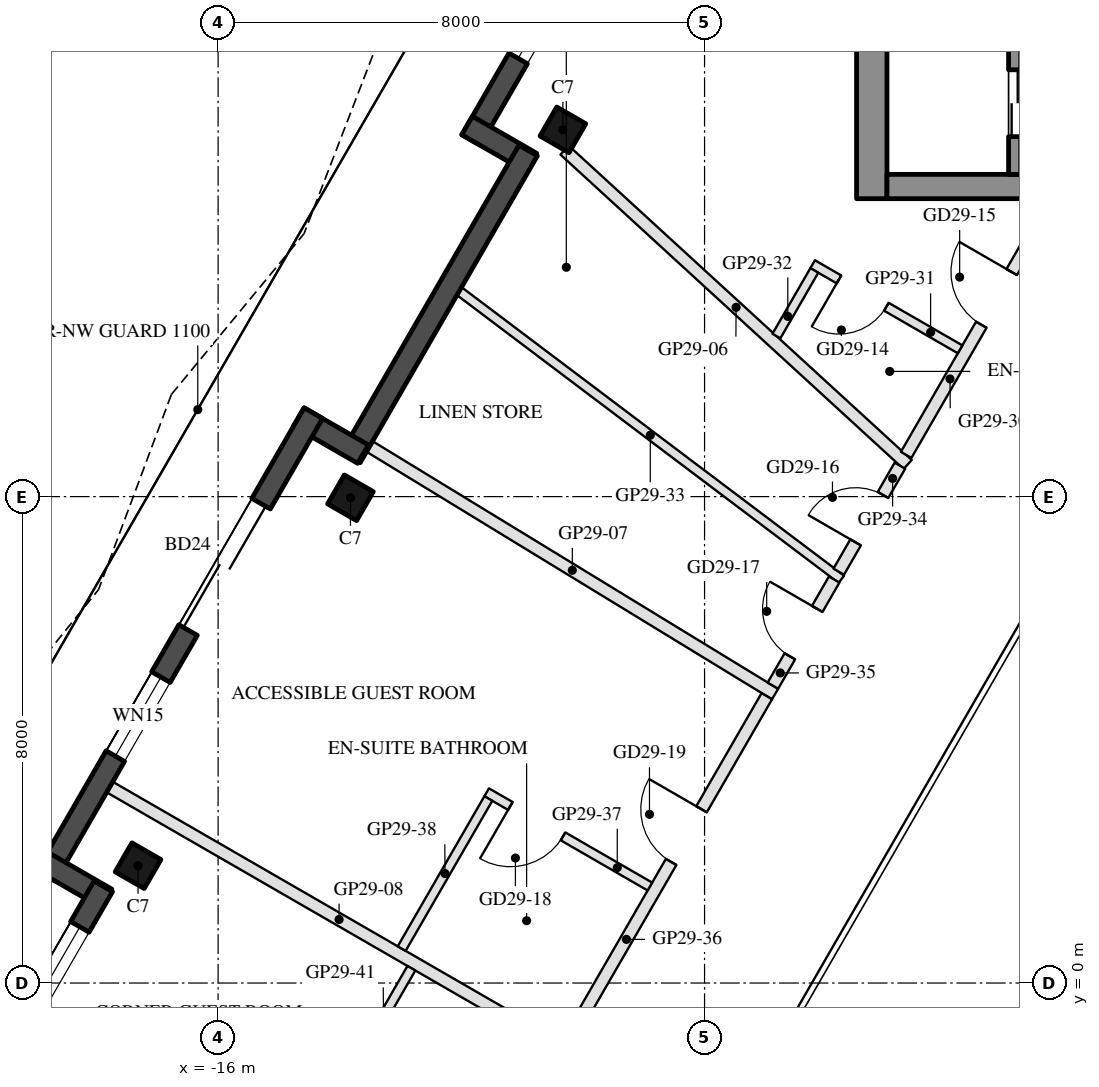
"""IFC4 building model, lengths in metres.
Left out: names, types, materials, properties, quantities, classifications, styles, units other than length and angle.
Written with IfcOpenShell. Run it as: python <this file> out.ifc"""

import sys

from ifc_helpers import new_model, si_unit, direction, frame, frame_2d, origin, origin_2d, place, context, subcontext, project, spatial, rectangle, hollow_rectangle, extrude, boolean, halfspace, element, fill, save


model = new_model("IFC4")
c1 = context("Model", 3, precision=1e-05, world=origin(), true_north=direction((0.0, 1.0)))
c2 = subcontext(c1, "Body", "Model", "MODEL_VIEW")
j1 = project(units=[si_unit("LENGTHUNIT", "METRE"), si_unit("PLANEANGLEUNIT", "RADIAN")], contexts=[c1])
p1 = place(None, origin())
s1 = spatial("IfcSite", under=j1, at=p1, CompositionType="ELEMENT")
p2 = place(p1, origin())
s2 = spatial("IfcBuilding", under=s1, at=p2, CompositionType="ELEMENT")
p3 = place(p2, frame((0.0, 0.0, 291.1)))
s3 = spatial("IfcBuildingStorey", under=s2, at=p3, CompositionType="ELEMENT", Elevation=291.1)
p4 = place(p3, frame((-10.33, 14.032, 0.0), z_axis=(0.0, 0.0, 1.0), x_axis=(0.5, 0.866025403784, 0.0)))
e1 = element("IfcColumn", 1, at=p4, inside=s3, PredefinedType="COLUMN", context=c2, shape_type="SweptSolid", body=[
    boolean("DIFFERENCE", extrude(hollow_rectangle(XDim=0.55, YDim=0.55, WallThickness=0.025, at=origin_2d()), origin(), (0.0, 0.0, 1.0), 3.7), halfspace(frame((0.0, 0.0, 0.034), z_axis=(0.0, 0.0, 1.0), x_axis=(1.0, 0.0, 0.0)), True)),
])
p5 = place(p3, frame((-13.823, 7.981, 0.0), z_axis=(0.0, 0.0, 1.0), x_axis=(0.5, 0.866025403784, 0.0)))
e2 = element("IfcColumn", 2, at=p5, inside=s3, PredefinedType="COLUMN", context=c2, shape_type="SweptSolid", body=[
    boolean("DIFFERENCE", extrude(hollow_rectangle(XDim=0.55, YDim=0.55, WallThickness=0.025, at=origin_2d()), origin(), (0.0, 0.0, 1.0), 3.7), halfspace(frame((0.0, 0.0, 0.031), z_axis=(0.0, 0.0, 1.0), x_axis=(1.0, 0.0, 0.0)), True)),
])
p6 = place(p3, frame((-17.317, 1.93, 0.0), z_axis=(0.0, 0.0, 1.0), x_axis=(0.5, 0.866025403784, 0.0)))
e3 = element("IfcColumn", 3, at=p6, inside=s3, PredefinedType="COLUMN", context=c2, shape_type="SweptSolid", body=[
    boolean("DIFFERENCE", extrude(hollow_rectangle(XDim=0.55, YDim=0.55, WallThickness=0.025, at=origin_2d()), origin(), (0.0, 0.0, 1.0), 3.7), halfspace(frame((0.0, 0.0, 0.034), z_axis=(0.0, 0.0, 1.0), x_axis=(1.0, 0.0, 0.0)), True)),
])
p7 = place(p3, frame((-6.563, 23.005, 0.0), z_axis=(0.0, 0.0, 1.0), x_axis=(-0.500010118922, -0.866019561543, 0.0)))
e4 = element("IfcWall", 4, at=p7, inside=s3, PredefinedType="SOLIDWALL", context=c2, shape_type="SweptSolid", body=[
    extrude(rectangle(XDim=10.554, YDim=0.35, at=frame_2d((5.277, 0.0))), origin(), (0.0, 0.0, 1.0), 3.55),
])
p8 = place(p7, frame((0.38, 0.0, 0.3)))
e5 = element("IfcOpeningElement", 5, at=p8, cuts=e4, PredefinedType="OPENING", context=c2, shape_type="SweptSolid", body=[
    extrude(rectangle(XDim=1.6, YDim=2.65, at=frame_2d((0.8, 1.325))), frame((0.0, 0.185, 0.0), z_axis=(0.0, -1.0, 0.0), x_axis=(1.0, 0.0, 0.0)), (0.0, 0.0, 1.0), 0.37),
])
p9 = place(p7, frame((3.798, 0.0, 0.0)))
e6 = element("IfcOpeningElement", 6, at=p9, cuts=e4, PredefinedType="OPENING", context=c2, shape_type="SweptSolid", body=[
    extrude(rectangle(XDim=2.4, YDim=2.4, at=frame_2d((1.2, 1.2))), frame((0.0, 0.185, 0.0), z_axis=(0.0, -1.0, 0.0), x_axis=(1.0, 0.0, 0.0)), (0.0, 0.0, 1.0), 0.37),
])
p10 = place(p7, frame((7.404, 0.0, 0.3)))
e7 = element("IfcOpeningElement", 7, at=p10, cuts=e4, PredefinedType="OPENING", context=c2, shape_type="SweptSolid", body=[
    extrude(rectangle(XDim=1.6, YDim=2.65, at=frame_2d((0.8, 1.325))), frame((0.0, 0.185, 0.0), z_axis=(0.0, -1.0, 0.0), x_axis=(1.0, 0.0, 0.0)), (0.0, 0.0, 1.0), 0.37),
])
p11 = place(p3, frame((-11.905, 14.104, 0.0), z_axis=(0.0, 0.0, 1.0), x_axis=(0.866005645448, -0.500034220881, 0.0)))
e8 = element("IfcWall", 8, at=p11, inside=s3, PredefinedType="SOLIDWALL", context=c2, shape_type="SweptSolid", body=[
    extrude(rectangle(XDim=1.22, YDim=0.35, at=frame_2d((0.61, 0.0))), origin(), (0.0, 0.0, 1.0), 3.55),
])
p12 = place(p3, frame((-10.901, 13.692, 0.0), z_axis=(0.0, 0.0, 1.0), x_axis=(-0.499987198161, -0.866032794804, 0.0)))
e9 = element("IfcWall", 9, at=p12, inside=s3, PredefinedType="SOLIDWALL", context=c2, shape_type="SweptSolid", body=[
    extrude(rectangle(XDim=5.827, YDim=0.35, at=frame_2d((2.914, 0.0))), origin(), (0.0, 0.0, 1.0), 3.55),
])
p13 = place(p3, frame((-13.616, 8.698, 0.0), z_axis=(0.0, 0.0, 1.0), x_axis=(-0.866005645448, 0.500034220881, 0.0)))
e10 = element("IfcWall", 10, at=p13, inside=s3, PredefinedType="SOLIDWALL", context=c2, shape_type="SweptSolid", body=[
    extrude(rectangle(XDim=1.22, YDim=0.35, at=frame_2d((0.61, 0.0))), origin(), (0.0, 0.0, 1.0), 3.55),
])
p14 = place(p3, frame((-14.434, 9.373, 0.0), z_axis=(0.0, 0.0, 1.0), x_axis=(-0.499999835575, -0.866025498715, 0.0)))
e11 = element("IfcWall", 11, at=p14, inside=s3, PredefinedType="SOLIDWALL", context=c2, shape_type="SweptSolid", body=[
    extrude(rectangle(XDim=8.787, YDim=0.35, at=frame_2d((4.394, 0.0))), origin(), (0.0, 0.0, 1.0), 3.55),
])
p15 = place(p14, frame((1.719, 0.0, 0.0)))
e12 = element("IfcOpeningElement", 12, at=p15, cuts=e11, PredefinedType="OPENING", context=c2, shape_type="SweptSolid", body=[
    extrude(rectangle(XDim=2.4, YDim=2.4, at=frame_2d((1.2, 1.2))), frame((0.0, 0.185, 0.0), z_axis=(0.0, -1.0, 0.0), x_axis=(1.0, 0.0, 0.0)), (0.0, 0.0, 1.0), 0.37),
])
p16 = place(p14, frame((5.013, 0.0, 0.3)))
e13 = element("IfcOpeningElement", 13, at=p16, cuts=e11, PredefinedType="OPENING", context=c2, shape_type="SweptSolid", body=[
    extrude(rectangle(XDim=1.5, YDim=2.65, at=frame_2d((0.75, 1.325))), frame((0.0, 0.185, 0.0), z_axis=(0.0, -1.0, 0.0), x_axis=(1.0, 0.0, 0.0)), (0.0, 0.0, 1.0), 0.37),
])
p17 = place(p3, frame((-18.892, 2.002, 0.0), z_axis=(0.0, 0.0, 1.0), x_axis=(0.866042269935, -0.499970785833, 0.0)))
e14 = element("IfcWall", 14, at=p17, inside=s3, PredefinedType="SOLIDWALL", context=c2, shape_type="SweptSolid", body=[
    extrude(rectangle(XDim=1.22, YDim=0.35, at=frame_2d((0.61, 0.0))), origin(), (0.0, 0.0, 1.0), 3.55),
])
p18 = place(p3, frame((-17.888, 1.59, 0.0), z_axis=(0.0, 0.0, 1.0), x_axis=(-0.499987198161, -0.866032794804, 0.0)))
e15 = element("IfcWall", 15, at=p18, inside=s3, PredefinedType="SOLIDWALL", context=c2, shape_type="SweptSolid", body=[
    extrude(rectangle(XDim=5.827, YDim=0.35, at=frame_2d((2.914, 0.0))), origin(), (0.0, 0.0, 1.0), 3.55),
])
p19 = place(p18, frame((2.657, 0.0, 0.0)))
e16 = element("IfcOpeningElement", 16, at=p19, cuts=e15, PredefinedType="OPENING", context=c2, shape_type="SweptSolid", body=[
    extrude(rectangle(XDim=2.4, YDim=2.4, at=frame_2d((1.2, 1.2))), frame((0.0, 0.185, 0.0), z_axis=(0.0, -1.0, 0.0), x_axis=(1.0, 0.0, 0.0)), (0.0, 0.0, 1.0), 0.37),
])
p20 = place(p18, frame((0.77, 0.0, 0.3)))
e17 = element("IfcOpeningElement", 17, at=p20, cuts=e15, PredefinedType="OPENING", context=c2, shape_type="SweptSolid", body=[
    extrude(rectangle(XDim=1.5, YDim=2.65, at=frame_2d((0.75, 1.325))), frame((0.0, 0.185, 0.0), z_axis=(0.0, -1.0, 0.0), x_axis=(1.0, 0.0, 0.0)), (0.0, 0.0, 1.0), 0.37),
])
p21 = place(p3, frame((-5.25, 12.9, 0.0), z_axis=(0.0, 0.0, 1.0), x_axis=(0.0, 1.0, 0.0)))
e18 = element("IfcWall", 18, at=p21, inside=s3, PredefinedType="SHEAR", context=c2, shape_type="SweptSolid", body=[
    extrude(rectangle(XDim=11.222, YDim=0.5, at=frame_2d((5.611, 0.0))), origin(), (0.0, 0.0, 1.0), 3.5),
])
p22 = place(p3, frame((5.0, 13.1, 0.0), z_axis=(0.0, 0.0, 1.0), x_axis=(-1.0, 0.0, 0.0)))
e19 = element("IfcWall", 19, at=p22, inside=s3, PredefinedType="SHEAR", context=c2, shape_type="SweptSolid", body=[
    extrude(rectangle(XDim=10.0, YDim=0.4, at=frame_2d((5.0, 0.0))), origin(), (0.0, 0.0, 1.0), 3.5),
])
p23 = place(p22, frame((3.55, 0.0, 0.0)))
e20 = element("IfcOpeningElement", 20, at=p23, cuts=e19, PredefinedType="OPENING", context=c2, shape_type="SweptSolid", body=[
    extrude(rectangle(XDim=1.1, YDim=2.1, at=frame_2d((0.55, 1.05))), frame((0.0, 0.21, 0.0), z_axis=(0.0, -1.0, 0.0), x_axis=(1.0, 0.0, 0.0)), (0.0, 0.0, 1.0), 0.42),
])
p24 = place(p22, frame((5.85, 0.0, 0.0)))
e21 = element("IfcOpeningElement", 21, at=p24, cuts=e19, PredefinedType="OPENING", context=c2, shape_type="SweptSolid", body=[
    extrude(rectangle(XDim=1.4, YDim=2.1, at=frame_2d((0.7, 1.05))), frame((0.0, 0.21, 0.0), z_axis=(0.0, -1.0, 0.0), x_axis=(1.0, 0.0, 0.0)), (0.0, 0.0, 1.0), 0.42),
])
p25 = place(p3, frame((-2.9, 13.3, 0.0), z_axis=(0.0, 0.0, 1.0), x_axis=(0.0, 1.0, 0.0)))
e22 = element("IfcWall", 22, at=p25, inside=s3, PredefinedType="SHEAR", context=c2, shape_type="SweptSolid", body=[
    extrude(rectangle(XDim=10.16, YDim=0.2, at=frame_2d((5.08, 0.0))), origin(), (0.0, 0.0, 1.0), 3.5),
])
p26 = place(p25, frame((0.62, 0.0, 0.0)))
e23 = element("IfcOpeningElement", 23, at=p26, cuts=e22, PredefinedType="OPENING", context=c2, shape_type="SweptSolid", body=[
    extrude(rectangle(XDim=1.1, YDim=2.1, at=frame_2d((0.55, 1.05))), frame((0.0, 0.11, 0.0), z_axis=(0.0, -1.0, 0.0), x_axis=(1.0, 0.0, 0.0)), (0.0, 0.0, 1.0), 0.22),
])
p27 = place(p25, frame((3.16, 0.0, 0.0)))
e24 = element("IfcOpeningElement", 24, at=p27, cuts=e22, PredefinedType="OPENING", context=c2, shape_type="SweptSolid", body=[
    extrude(rectangle(XDim=1.1, YDim=2.1, at=frame_2d((0.55, 1.05))), frame((0.0, 0.11, 0.0), z_axis=(0.0, -1.0, 0.0), x_axis=(1.0, 0.0, 0.0)), (0.0, 0.0, 1.0), 0.22),
])
p28 = place(p25, frame((5.7, 0.0, 0.0)))
e25 = element("IfcOpeningElement", 25, at=p28, cuts=e22, PredefinedType="OPENING", context=c2, shape_type="SweptSolid", body=[
    extrude(rectangle(XDim=1.1, YDim=2.1, at=frame_2d((0.55, 1.05))), frame((0.0, 0.11, 0.0), z_axis=(0.0, -1.0, 0.0), x_axis=(1.0, 0.0, 0.0)), (0.0, 0.0, 1.0), 0.22),
])
p29 = place(p25, frame((8.34, 0.0, 0.0)))
e26 = element("IfcOpeningElement", 26, at=p29, cuts=e22, PredefinedType="OPENING", context=c2, shape_type="SweptSolid", body=[
    extrude(rectangle(XDim=0.9, YDim=2.1, at=frame_2d((0.45, 1.05))), frame((0.0, 0.11, 0.0), z_axis=(0.0, -1.0, 0.0), x_axis=(1.0, 0.0, 0.0)), (0.0, 0.0, 1.0), 0.22),
])
p30 = place(p3, frame((-10.302, 13.698, 0.0), z_axis=(0.0, 0.0, 1.0), x_axis=(0.737268015828, -0.675600379541, 0.0)))
e27 = element("IfcWall", 27, at=p30, inside=s3, PredefinedType="PARTITIONING", context=c2, shape_type="SweptSolid", body=[
    extrude(rectangle(XDim=7.653, YDim=0.2, at=frame_2d((3.826, 0.0))), origin(), (0.0, 0.0, 1.0), 3.55),
])
p31 = place(p3, frame((-13.509, 8.825, 0.0), z_axis=(0.0, 0.0, 1.0), x_axis=(0.853427769022, -0.521211130984, 0.0)))
e28 = element("IfcWall", 28, at=p31, inside=s3, PredefinedType="PARTITIONING", context=c2, shape_type="SweptSolid", body=[
    extrude(rectangle(XDim=7.814, YDim=0.2, at=frame_2d((3.907, 0.0))), origin(), (0.0, 0.0, 1.0), 3.16),
])
p32 = place(p3, frame((-17.782, 3.223, 0.0), z_axis=(0.0, 0.0, 1.0), x_axis=(0.866016642396, -0.500015174863, 0.0)))
e29 = element("IfcWall", 29, at=p32, inside=s3, PredefinedType="PARTITIONING", context=c2, shape_type="SweptSolid", body=[
    extrude(rectangle(XDim=8.712, YDim=0.2, at=frame_2d((4.356, 0.0))), origin(), (0.0, 0.0, 1.0), 3.16),
])
p33 = place(p3, frame((-4.685, 8.686, 0.0), z_axis=(0.0, 0.0, 1.0), x_axis=(0.500011088314, 0.866019001848, 0.0)))
e30 = element("IfcWall", 30, at=p33, inside=s3, PredefinedType="PARTITIONING", context=c2, shape_type="SweptSolid", body=[
    extrude(rectangle(XDim=4.808, YDim=0.2, at=frame_2d((2.404, 0.0))), origin(), (0.0, 0.0, 1.0), 3.05),
])
p34 = place(p33, frame((2.472, 0.0, 0.0)))
e31 = element("IfcOpeningElement", 31, at=p34, cuts=e30, PredefinedType="OPENING", context=c2, shape_type="SweptSolid", body=[
    extrude(rectangle(XDim=1.0, YDim=2.1, at=frame_2d((0.5, 1.05))), frame((0.0, 0.11, 0.0), z_axis=(0.0, -1.0, 0.0), x_axis=(1.0, 0.0, 0.0)), (0.0, 0.0, 1.0), 0.22),
])
p35 = place(p3, frame((-3.798, 10.423, 0.0), z_axis=(0.0, 0.0, 1.0), x_axis=(-0.866034573852, 0.49998411664, 0.0)))
e32 = element("IfcWall", 32, at=p35, inside=s3, PredefinedType="PARTITIONING", context=c2, shape_type="SweptSolid", body=[
    extrude(rectangle(XDim=2.8, YDim=0.15, at=frame_2d((1.4, 0.0))), origin(), (0.0, 0.0, 1.0), 3.05),
])
p36 = place(p35, frame((1.4, 0.0, 0.0)))
e33 = element("IfcOpeningElement", 33, at=p36, cuts=e32, PredefinedType="OPENING", context=c2, shape_type="SweptSolid", body=[
    extrude(rectangle(XDim=0.9, YDim=2.1, at=frame_2d((0.45, 1.05))), frame((0.0, 0.085, 0.0), z_axis=(0.0, -1.0, 0.0), x_axis=(1.0, 0.0, 0.0)), (0.0, 0.0, 1.0), 0.17),
])
p37 = place(p3, frame((-6.195, 11.72, 0.0), z_axis=(0.0, 0.0, 1.0), x_axis=(-0.500016430238, -0.866015917575, 0.0)))
e34 = element("IfcWall", 34, at=p37, inside=s3, PredefinedType="PARTITIONING", context=c2, shape_type="SweptSolid", body=[
    extrude(rectangle(XDim=1.246, YDim=0.15, at=frame_2d((0.623, 0.0))), origin(), (0.0, 0.0, 1.0), 3.05),
])
p38 = place(p3, frame((-12.034, 11.379, 0.0), z_axis=(0.0, 0.0, 1.0), x_axis=(0.798392848023, -0.602136911528, 0.0)))
e35 = element("IfcWall", 35, at=p38, inside=s3, PredefinedType="PARTITIONING", context=c2, shape_type="SweptSolid", body=[
    extrude(rectangle(XDim=7.871, YDim=0.15, at=frame_2d((3.936, 0.0))), origin(), (0.0, 0.0, 1.0), 3.05),
])
p39 = place(p3, frame((-5.793, 6.766, 0.0), z_axis=(0.0, 0.0, 1.0), x_axis=(0.500026968848, 0.866009832753, 0.0)))
e36 = element("IfcWall", 36, at=p39, inside=s3, PredefinedType="PARTITIONING", context=c2, shape_type="SweptSolid", body=[
    extrude(rectangle(XDim=2.013, YDim=0.2, at=frame_2d((1.006, 0.0))), origin(), (0.0, 0.0, 1.0), 3.05),
])
p40 = place(p39, frame((0.556, 0.0, 0.0)))
e37 = element("IfcOpeningElement", 37, at=p40, cuts=e36, PredefinedType="OPENING", context=c2, shape_type="SweptSolid", body=[
    extrude(rectangle(XDim=0.9, YDim=2.1, at=frame_2d((0.45, 1.05))), frame((0.0, 0.11, 0.0), z_axis=(0.0, -1.0, 0.0), x_axis=(1.0, 0.0, 0.0)), (0.0, 0.0, 1.0), 0.22),
])
p41 = place(p3, frame((-6.876, 4.891, 0.0), z_axis=(0.0, 0.0, 1.0), x_axis=(0.499865783083, 0.866102880092, 0.0)))
e38 = element("IfcWall", 38, at=p41, inside=s3, PredefinedType="PARTITIONING", context=c2, shape_type="SweptSolid", body=[
    extrude(rectangle(XDim=2.015, YDim=0.2, at=frame_2d((1.008, 0.0))), origin(), (0.0, 0.0, 1.0), 3.55),
])
p42 = place(p41, frame((0.558, 0.0, 0.0)))
e39 = element("IfcOpeningElement", 39, at=p42, cuts=e38, PredefinedType="OPENING", context=c2, shape_type="SweptSolid", body=[
    extrude(rectangle(XDim=0.9, YDim=2.1, at=frame_2d((0.45, 1.05))), frame((0.0, 0.11, 0.0), z_axis=(0.0, -1.0, 0.0), x_axis=(1.0, 0.0, 0.0)), (0.0, 0.0, 1.0), 0.22),
])
p43 = place(p3, frame((-10.275, -0.996, 0.0), z_axis=(0.0, 0.0, 1.0), x_axis=(0.500007539231, 0.866021050964, 0.0)))
e40 = element("IfcWall", 40, at=p43, inside=s3, PredefinedType="PARTITIONING", context=c2, shape_type="SweptSolid", body=[
    extrude(rectangle(XDim=6.598, YDim=0.2, at=frame_2d((3.299, 0.0))), origin(), (0.0, 0.0, 1.0), 3.05),
])
p44 = place(p43, frame((3.45, 0.0, 0.0)))
e41 = element("IfcOpeningElement", 41, at=p44, cuts=e40, PredefinedType="OPENING", context=c2, shape_type="SweptSolid", body=[
    extrude(rectangle(XDim=1.0, YDim=2.1, at=frame_2d((0.5, 1.05))), frame((0.0, 0.11, 0.0), z_axis=(0.0, -1.0, 0.0), x_axis=(1.0, 0.0, 0.0)), (0.0, 0.0, 1.0), 0.22),
])
p45 = place(p3, frame((-8.899, 1.587, 0.0), z_axis=(0.0, 0.0, 1.0), x_axis=(-0.86602952684, 0.49999285859, 0.0)))
e42 = element("IfcWall", 42, at=p45, inside=s3, PredefinedType="PARTITIONING", context=c2, shape_type="SweptSolid", body=[
    extrude(rectangle(XDim=3.1, YDim=0.15, at=frame_2d((1.55, 0.0))), origin(), (0.0, 0.0, 1.0), 3.55),
])
p46 = place(p45, frame((1.65, 0.0, 0.0)))
e43 = element("IfcOpeningElement", 43, at=p46, cuts=e42, PredefinedType="OPENING", context=c2, shape_type="SweptSolid", body=[
    extrude(rectangle(XDim=1.0, YDim=2.1, at=frame_2d((0.5, 1.05))), frame((0.0, 0.085, 0.0), z_axis=(0.0, -1.0, 0.0), x_axis=(1.0, 0.0, 0.0)), (0.0, 0.0, 1.0), 0.17),
])
p47 = place(p3, frame((-11.556, 3.034, 0.0), z_axis=(0.0, 0.0, 1.0), x_axis=(-0.500036373335, -0.866004402611, 0.0)))
e44 = element("IfcWall", 44, at=p47, inside=s3, PredefinedType="PARTITIONING", context=c2, shape_type="SweptSolid", body=[
    extrude(rectangle(XDim=2.85, YDim=0.15, at=frame_2d((1.425, 0.0))), origin(), (0.0, 0.0, 1.0), 3.05),
])
p48 = place(p3, frame((-12.821, 0.243, 0.0), z_axis=(0.0, 0.0, 1.0), x_axis=(-0.500009850223, -0.866019716681, 0.0)))
e45 = element("IfcWall", 45, at=p48, inside=s3, PredefinedType="PARTITIONING", context=c2, shape_type="SweptSolid", body=[
    extrude(rectangle(XDim=1.838, YDim=0.15, at=frame_2d((0.919, 0.0))), origin(), (0.0, 0.0, 1.0), 3.05),
])
p49 = place(p10, origin())
e46 = element("IfcWindow", 46, at=p49, inside=s3, PartitioningType="SINGLE_PANEL", PredefinedType="WINDOW", context=c2, shape_type="SweptSolid", body=[
    extrude(rectangle(XDim=1.6, YDim=2.65, at=frame_2d((0.8, 1.325))), frame((0.0, 0.03, 0.0), z_axis=(0.0, -1.0, 0.0), x_axis=(1.0, 0.0, 0.0)), (0.0, 0.0, 1.0), 0.06),
])
fill(e7, e46)
p50 = place(p15, frame((2.4, 0.0, 0.0), z_axis=(0.0, 0.0, 1.0), x_axis=(-1.0, 0.0, 0.0)))
e47 = element("IfcDoor", 47, at=p50, inside=s3, OperationType="SLIDING_TO_LEFT", PredefinedType="DOOR", context=c2, shape_type="SweptSolid", body=[
    extrude(rectangle(XDim=2.4, YDim=2.4, at=frame_2d((1.2, 1.2))), frame((0.0, 0.025, 0.0), z_axis=(0.0, -1.0, 0.0), x_axis=(1.0, 0.0, 0.0)), (0.0, 0.0, 1.0), 0.05),
])
fill(e12, e47)
p51 = place(p16, origin())
e48 = element("IfcWindow", 48, at=p51, inside=s3, PartitioningType="SINGLE_PANEL", PredefinedType="WINDOW", context=c2, shape_type="SweptSolid", body=[
    extrude(rectangle(XDim=1.5, YDim=2.65, at=frame_2d((0.75, 1.325))), frame((0.0, 0.03, 0.0), z_axis=(0.0, -1.0, 0.0), x_axis=(1.0, 0.0, 0.0)), (0.0, 0.0, 1.0), 0.06),
])
fill(e13, e48)
p52 = place(p20, origin())
e49 = element("IfcWindow", 49, at=p52, inside=s3, PartitioningType="SINGLE_PANEL", PredefinedType="WINDOW", context=c2, shape_type="SweptSolid", body=[
    extrude(rectangle(XDim=1.5, YDim=2.65, at=frame_2d((0.75, 1.325))), frame((0.0, 0.03, 0.0), z_axis=(0.0, -1.0, 0.0), x_axis=(1.0, 0.0, 0.0)), (0.0, 0.0, 1.0), 0.06),
])
fill(e17, e49)
p53 = place(p26, origin())
e50 = element("IfcDoor", 50, at=p53, inside=s3, OperationType="DOUBLE_DOOR_SLIDING", PredefinedType="DOOR", context=c2, shape_type="SweptSolid", body=[
    extrude(rectangle(XDim=1.1, YDim=2.1, at=frame_2d((0.55, 1.05))), frame((0.0, 0.025, 0.0), z_axis=(0.0, -1.0, 0.0), x_axis=(1.0, 0.0, 0.0)), (0.0, 0.0, 1.0), 0.05),
])
fill(e23, e50)
p54 = place(p36, origin())
e51 = element("IfcDoor", 51, at=p54, inside=s3, OperationType="SINGLE_SWING_RIGHT", PredefinedType="DOOR", context=c2, shape_type="SweptSolid", body=[
    extrude(rectangle(XDim=0.9, YDim=2.1, at=frame_2d((0.45, 1.05))), frame((0.0, 0.025, 0.0), z_axis=(0.0, -1.0, 0.0), x_axis=(1.0, 0.0, 0.0)), (0.0, 0.0, 1.0), 0.05),
])
fill(e33, e51)
p55 = place(p34, origin())
e52 = element("IfcDoor", 52, at=p55, inside=s3, OperationType="SINGLE_SWING_RIGHT", PredefinedType="DOOR", context=c2, shape_type="SweptSolid", body=[
    extrude(rectangle(XDim=1.0, YDim=2.1, at=frame_2d((0.5, 1.05))), frame((0.0, 0.025, 0.0), z_axis=(0.0, -1.0, 0.0), x_axis=(1.0, 0.0, 0.0)), (0.0, 0.0, 1.0), 0.05),
])
fill(e31, e52)
p56 = place(p40, origin())
e53 = element("IfcDoor", 53, at=p56, inside=s3, OperationType="SINGLE_SWING_LEFT", PredefinedType="DOOR", context=c2, shape_type="SweptSolid", body=[
    extrude(rectangle(XDim=0.9, YDim=2.1, at=frame_2d((0.45, 1.05))), frame((0.0, 0.025, 0.0), z_axis=(0.0, -1.0, 0.0), x_axis=(1.0, 0.0, 0.0)), (0.0, 0.0, 1.0), 0.05),
])
fill(e37, e53)
p57 = place(p42, origin())
e54 = element("IfcDoor", 54, at=p57, inside=s3, OperationType="SINGLE_SWING_RIGHT", PredefinedType="DOOR", context=c2, shape_type="SweptSolid", body=[
    extrude(rectangle(XDim=0.9, YDim=2.1, at=frame_2d((0.45, 1.05))), frame((0.0, 0.025, 0.0), z_axis=(0.0, -1.0, 0.0), x_axis=(1.0, 0.0, 0.0)), (0.0, 0.0, 1.0), 0.05),
])
fill(e39, e54)
p58 = place(p46, origin())
e55 = element("IfcDoor", 55, at=p58, inside=s3, OperationType="SINGLE_SWING_RIGHT", PredefinedType="DOOR", context=c2, shape_type="SweptSolid", body=[
    extrude(rectangle(XDim=1.0, YDim=2.1, at=frame_2d((0.5, 1.05))), frame((0.0, 0.025, 0.0), z_axis=(0.0, -1.0, 0.0), x_axis=(1.0, 0.0, 0.0)), (0.0, 0.0, 1.0), 0.05),
])
fill(e43, e55)
p59 = place(p44, origin())
e56 = element("IfcDoor", 56, at=p59, inside=s3, OperationType="SINGLE_SWING_RIGHT", PredefinedType="DOOR", context=c2, shape_type="SweptSolid", body=[
    extrude(rectangle(XDim=1.0, YDim=2.1, at=frame_2d((0.5, 1.05))), frame((0.0, 0.025, 0.0), z_axis=(0.0, -1.0, 0.0), x_axis=(1.0, 0.0, 0.0)), (0.0, 0.0, 1.0), 0.05),
])
fill(e41, e56)
save(model, sys.argv[1])
